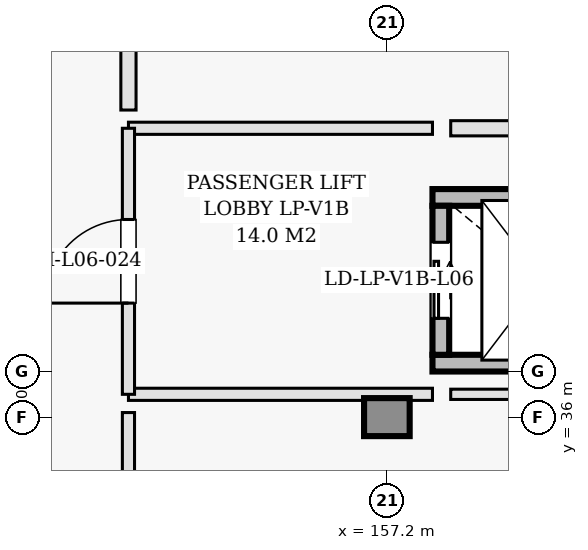
"""IFC4 building model, lengths in metres.
Left out: names, types, materials, properties, quantities, classifications, styles, units other than length and angle.
Written with IfcOpenShell. Run it as: python <this file> out.ifc"""

import sys

from ifc_helpers import new_model, si_unit, direction, frame, frame_2d, origin, origin_2d, place, context, subcontext, project, spatial, rectangle, extrude, element, fill, save


model = new_model("IFC4")
c1 = context("Model", 3, precision=1e-05, world=origin(), true_north=direction((0.0, 1.0)))
c2 = subcontext(c1, "Body", "Model", "MODEL_VIEW")
j1 = project(units=[si_unit("LENGTHUNIT", "METRE"), si_unit("PLANEANGLEUNIT", "RADIAN")], contexts=[c1])
p1 = place(None, origin())
s1 = spatial("IfcSite", under=j1, at=p1, CompositionType="ELEMENT")
p2 = place(p1, origin())
s2 = spatial("IfcBuilding", under=s1, at=p2, CompositionType="ELEMENT")
p3 = place(p2, frame((0.0, 0.0, 26.4)))
s3 = spatial("IfcBuildingStorey", under=s2, at=p3, CompositionType="ELEMENT", Elevation=26.4)
p4 = place(p3, frame((157.2, 36.0, 0.0), z_axis=(0.0, 0.0, 1.0), x_axis=(1.0, 0.0, 0.0)))
e1 = element("IfcColumn", 1, at=p4, inside=s3, PredefinedType="COLUMN", context=c2, shape_type="SweptSolid", body=[
    extrude(rectangle(XDim=0.5, YDim=0.5, at=origin_2d()), origin(), (0.0, 0.0, 1.0), 3.45),
])
for number, where, z_axis, x_axis in (
    (2, (157.8, 36.71, 0.0), (0.0, 0.0, 1.0), (1.0, 0.0, 0.0)),
    (3, (157.8, 38.89, 0.0), (0.0, 0.0, 1.0), (1.0, 0.0, 0.0)),
):
    element("IfcWall", number, at=place(p3, frame(where, z_axis=z_axis, x_axis=x_axis)), inside=s3, PredefinedType="SHEAR", context=c2, shape_type="SweptSolid", body=[
        extrude(rectangle(XDim=2.9, YDim=0.22, at=frame_2d((1.45, 0.0))), origin(), (0.0, 0.0, 1.0), 3.22),
    ])
p5 = place(p3, frame((157.91, 36.82, 0.0), z_axis=(0.0, 0.0, 1.0), x_axis=(0.0, 1.0, 0.0)))
e4 = element("IfcWall", 4, at=p5, inside=s3, PredefinedType="SHEAR", context=c2, shape_type="SweptSolid", body=[
    extrude(rectangle(XDim=1.96, YDim=0.22, at=frame_2d((0.98, 0.0))), origin(), (0.0, 0.0, 1.0), 3.22),
])
p6 = place(p5, frame((0.48, 0.0, 0.0)))
e5 = element("IfcOpeningElement", 5, at=p6, cuts=e4, PredefinedType="OPENING", context=c2, shape_type="SweptSolid", body=[
    extrude(rectangle(XDim=1.0, YDim=2.15, at=frame_2d((0.5, 1.075))), frame((0.0, 0.12, 0.0), z_axis=(0.0, -1.0, 0.0), x_axis=(1.0, 0.0, 0.0)), (0.0, 0.0, 1.0), 0.24),
])
p7 = place(p3, frame((153.8, 36.3, 0.0), z_axis=(0.0, 0.0, 1.0), x_axis=(1.0, 0.0, 0.0)))
e6 = element("IfcWall", 6, at=p7, inside=s3, PredefinedType="PARTITIONING", context=c2, shape_type="SweptSolid", body=[
    extrude(rectangle(XDim=4.0, YDim=0.16, at=frame_2d((2.0, 0.0))), origin(), (0.0, 0.0, 1.0), 2.405),
])
p8 = place(p3, frame((153.8, 39.8, 0.0), z_axis=(0.0, 0.0, 1.0), x_axis=(1.0, 0.0, 0.0)))
e7 = element("IfcWall", 7, at=p8, inside=s3, PredefinedType="PARTITIONING", context=c2, shape_type="SweptSolid", body=[
    extrude(rectangle(XDim=4.0, YDim=0.16, at=frame_2d((2.0, 0.0))), origin(), (0.0, 0.0, 1.0), 2.555),
])
p9 = place(p3, frame((153.8, 36.3, 0.0), z_axis=(0.0, 0.0, 1.0), x_axis=(0.0, 1.0, 0.0)))
e8 = element("IfcWall", 8, at=p9, inside=s3, PredefinedType="PARTITIONING", context=c2, shape_type="SweptSolid", body=[
    extrude(rectangle(XDim=3.5, YDim=0.16, at=frame_2d((1.75, 0.0))), origin(), (0.0, 0.0, 1.0), 3.22),
])
p10 = place(p9, frame((1.2, 0.0, 0.0)))
e9 = element("IfcOpeningElement", 9, at=p10, cuts=e8, PredefinedType="OPENING", context=c2, shape_type="SweptSolid", body=[
    extrude(rectangle(XDim=1.1, YDim=2.15, at=frame_2d((0.55, 1.075))), frame((0.0, 0.09, 0.0), z_axis=(0.0, -1.0, 0.0), x_axis=(1.0, 0.0, 0.0)), (0.0, 0.0, 1.0), 0.18),
])
p11 = place(p3, frame((153.8, 40.04, 0.0), z_axis=(0.0, 0.0, 1.0), x_axis=(0.0, 1.0, 0.0)))
e10 = element("IfcWall", 10, at=p11, inside=s3, PredefinedType="PARTITIONING", context=c2, shape_type="SweptSolid", body=[
    extrude(rectangle(XDim=5.67, YDim=0.2, at=frame_2d((2.835, 0.0))), origin(), (0.0, 0.0, 1.0), 2.405),
])
p12 = place(p11, frame((2.135, 0.0, 0.0)))
e11 = element("IfcOpeningElement", 11, at=p12, cuts=e10, PredefinedType="OPENING", context=c2, shape_type="SweptSolid", body=[
    extrude(rectangle(XDim=1.4, YDim=2.15, at=frame_2d((0.7, 1.075))), frame((0.0, 0.11, 0.0), z_axis=(0.0, -1.0, 0.0), x_axis=(1.0, 0.0, 0.0)), (0.0, 0.0, 1.0), 0.22),
])
p13 = place(p3, frame((158.04, 39.8, 0.0), z_axis=(0.0, 0.0, 1.0), x_axis=(1.0, 0.0, 0.0)))
e12 = element("IfcWall", 12, at=p13, inside=s3, PredefinedType="PARTITIONING", context=c2, shape_type="SweptSolid", body=[
    extrude(rectangle(XDim=19.077, YDim=0.2, at=frame_2d((9.539, 0.0))), origin(), (0.0, 0.0, 1.0), 2.555),
])
p14 = place(p3, frame((153.8, 24.85, 0.0), z_axis=(0.0, 0.0, 1.0), x_axis=(0.0, 1.0, 0.0)))
e13 = element("IfcWall", 13, at=p14, inside=s3, PredefinedType="PARTITIONING", context=c2, shape_type="SweptSolid", body=[
    extrude(rectangle(XDim=11.21, YDim=0.16, at=frame_2d((5.605, 0.0))), origin(), (0.0, 0.0, 1.0), 2.405),
])
p15 = place(p14, frame((4.705, 0.0, 0.0)))
e14 = element("IfcOpeningElement", 14, at=p15, cuts=e13, PredefinedType="OPENING", context=c2, shape_type="SweptSolid", body=[
    extrude(rectangle(XDim=1.8, YDim=2.2, at=frame_2d((0.9, 1.1))), frame((0.0, 0.09, 0.0), z_axis=(0.0, -1.0, 0.0), x_axis=(1.0, 0.0, 0.0)), (0.0, 0.0, 1.0), 0.18),
])
p16 = place(p3, frame((158.04, 36.3, 0.0), z_axis=(0.0, 0.0, 1.0), x_axis=(1.0, 0.0, 0.0)))
e15 = element("IfcWall", 15, at=p16, inside=s3, PredefinedType="PARTITIONING", context=c2, shape_type="SweptSolid", body=[
    extrude(rectangle(XDim=17.794, YDim=0.135, at=frame_2d((8.897, 0.0))), origin(), (0.0, 0.0, 1.0), 2.405),
])
p17 = place(p6, origin())
e16 = element("IfcDoor", 16, at=p17, inside=s3, OperationType="SLIDING_TO_LEFT", PredefinedType="DOOR", context=c2, shape_type="SweptSolid", body=[
    extrude(rectangle(XDim=1.0, YDim=2.15, at=frame_2d((0.5, 1.075))), frame((0.0, 0.025, 0.0), z_axis=(0.0, -1.0, 0.0), x_axis=(1.0, 0.0, 0.0)), (0.0, 0.0, 1.0), 0.05),
])
fill(e5, e16)
p18 = place(p10, origin())
e17 = element("IfcDoor", 17, at=p18, inside=s3, OperationType="SINGLE_SWING_LEFT", PredefinedType="DOOR", context=c2, shape_type="SweptSolid", body=[
    extrude(rectangle(XDim=1.1, YDim=2.15, at=frame_2d((0.55, 1.075))), frame((0.0, 0.025, 0.0), z_axis=(0.0, -1.0, 0.0), x_axis=(1.0, 0.0, 0.0)), (0.0, 0.0, 1.0), 0.05),
])
fill(e9, e17)
save(model, sys.argv[1])
